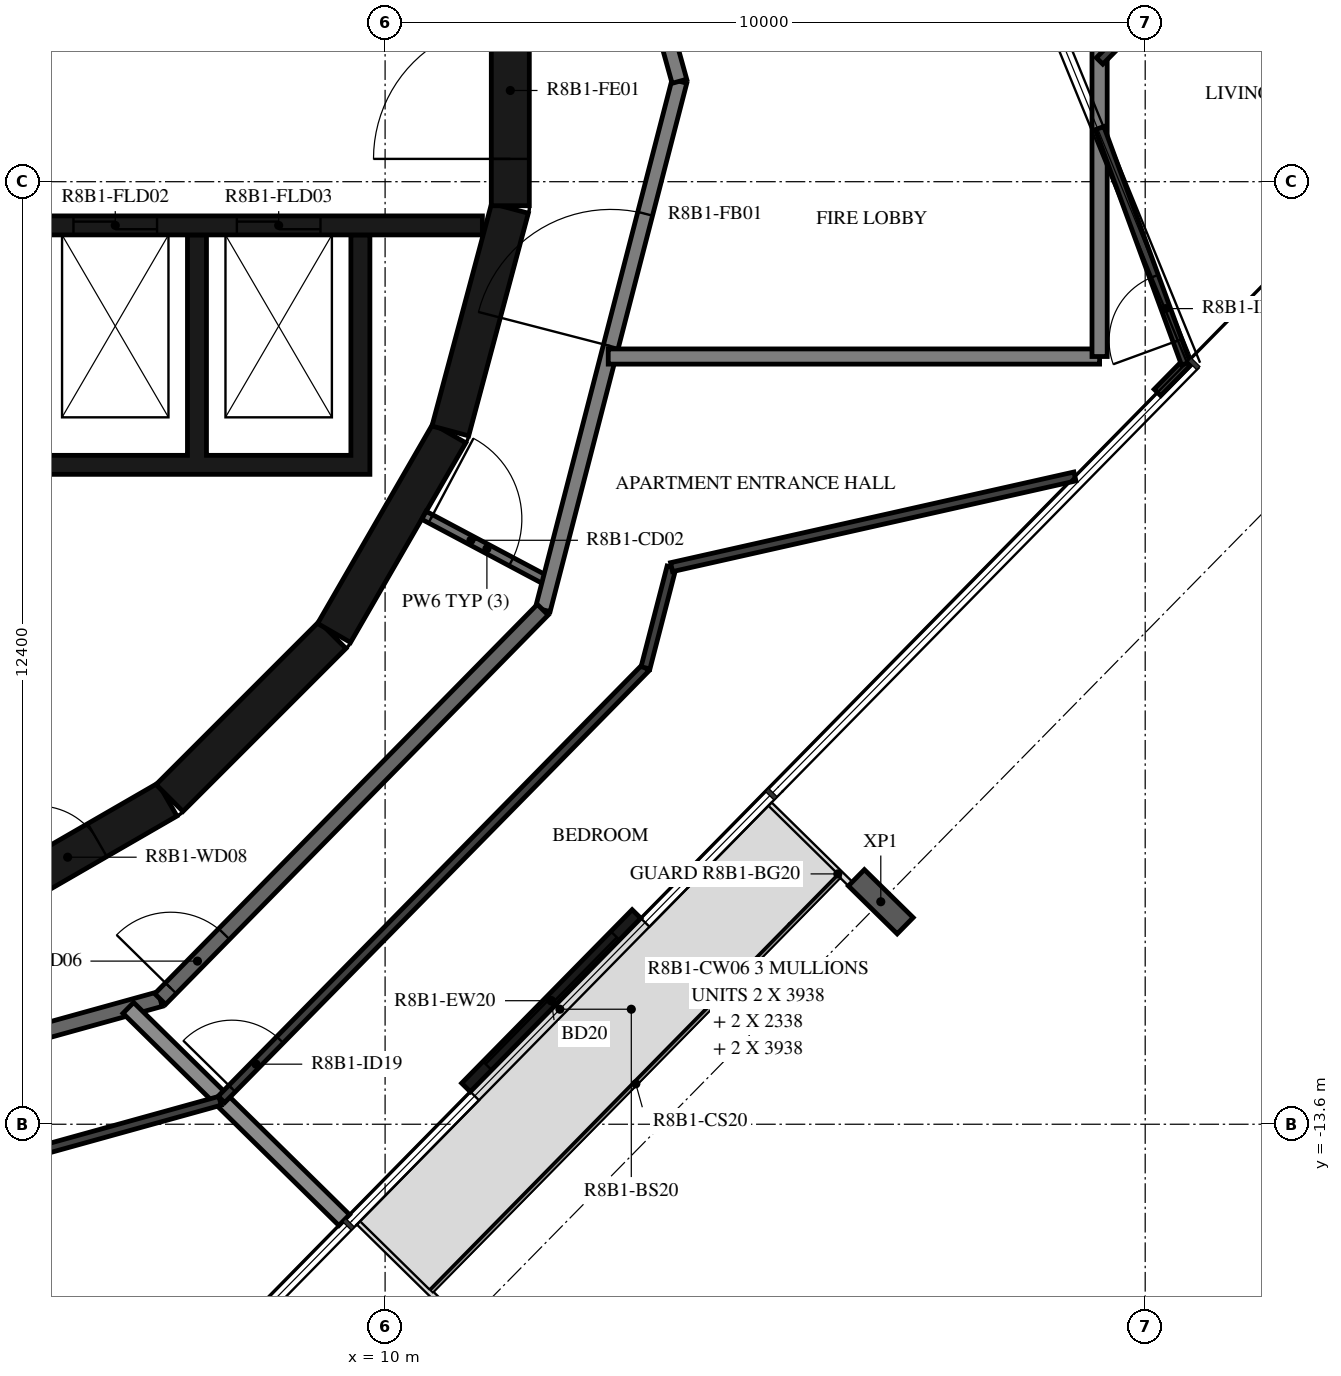
"""IFC4 building model, lengths in metres.
Left out: names, types, materials, properties, quantities, classifications, styles, units other than length and angle.
Written with IfcOpenShell. Run it as: python <this file> out.ifc"""

import sys

from ifc_helpers import new_model, si_unit, direction, frame, frame_2d, origin, origin_2d, place, context, subcontext, project, spatial, polyline, rectangle, i_section, outline, extrude, element, fill, save


model = new_model("IFC4")
c1 = context("Model", 3, precision=1e-05, world=origin(), true_north=direction((0.0, 1.0)))
c2 = subcontext(c1, "Body", "Model", "MODEL_VIEW")
j1 = project(units=[si_unit("LENGTHUNIT", "METRE"), si_unit("PLANEANGLEUNIT", "RADIAN")], contexts=[c1])
p1 = place(None, origin())
s1 = spatial("IfcSite", under=j1, at=p1, CompositionType="ELEMENT")
p2 = place(p1, origin())
s2 = spatial("IfcBuilding", under=s1, at=p2, CompositionType="ELEMENT")
p3 = place(p2, frame((0.0, 0.0, 308.7)))
s3 = spatial("IfcBuildingStorey", under=s2, at=p3, CompositionType="ELEMENT", Elevation=308.7)
p4 = place(p3, frame((16.521, -10.673, -0.38), z_axis=(0.0, 0.0, 1.0), x_axis=(-0.70090935439, -0.713250360623, 0.0)))
e1 = element("IfcColumn", 1, at=p4, inside=s3, PredefinedType="COLUMN", context=c2, shape_type="SweptSolid", body=[
    extrude(i_section(OverallWidth=0.3, OverallDepth=0.9, WebThickness=0.019, FlangeThickness=0.035, FilletRadius=0.03, at=origin_2d()), origin(), (0.0, 0.0, 1.0), 3.5),
])
p5 = place(p3, frame((11.064, -13.116, 0.0), z_axis=(0.0, 0.0, 1.0), x_axis=(0.700900076932, 0.713259477439, 0.0)))
e2 = element("IfcWall", 2, at=p5, inside=s3, PredefinedType="STANDARD", context=c2, shape_type="SweptSolid", body=[
    extrude(rectangle(XDim=3.2, YDim=0.16, at=frame_2d((1.6, 0.0))), origin(), (0.0, 0.0, 1.0), 3.12),
])
p6 = place(p5, frame((0.4, 0.0, 0.0)))
e3 = element("IfcOpeningElement", 3, at=p6, cuts=e2, PredefinedType="OPENING", context=c2, shape_type="SweptSolid", body=[
    extrude(rectangle(XDim=2.4, YDim=2.4, at=frame_2d((1.2, 1.2))), frame((0.0, 0.09, 0.0), z_axis=(0.0, -1.0, 0.0), x_axis=(1.0, 0.0, 0.0)), (0.0, 0.0, 1.0), 0.18),
])
p7 = place(p3, frame((4.51, -10.845, 0.0), z_axis=(0.0, 0.0, 1.0), x_axis=(0.865975092491, 0.500087131594, 0.0)))
e4 = element("IfcWall", 4, at=p7, inside=s3, PredefinedType="SHEAR", context=c2, shape_type="SweptSolid", body=[
    extrude(rectangle(XDim=3.033, YDim=0.5, at=frame_2d((1.516, 0.0))), origin(), (0.0, 0.0, 1.0), 3.12),
])
p8 = place(p7, frame((1.066, 0.0, 0.0)))
e5 = element("IfcOpeningElement", 5, at=p8, cuts=e4, PredefinedType="OPENING", context=c2, shape_type="SweptSolid", body=[
    extrude(rectangle(XDim=0.9, YDim=2.1, at=frame_2d((0.45, 1.05))), frame((0.0, 0.26, 0.0), z_axis=(0.0, -1.0, 0.0), x_axis=(1.0, 0.0, 0.0)), (0.0, 0.0, 1.0), 0.52),
])
p9 = place(p3, frame((7.164, -9.308, 0.0), z_axis=(0.0, 0.0, 1.0), x_axis=(0.707106781187, 0.707106781187, 0.0)))
e6 = element("IfcWall", 6, at=p9, inside=s3, PredefinedType="SHEAR", context=c2, shape_type="SweptSolid", body=[
    extrude(rectangle(XDim=3.032, YDim=0.5, at=frame_2d((1.516, 0.0))), origin(), (0.0, 0.0, 1.0), 3.12),
])
for number, where, z_axis, x_axis in (
    (7, (9.329, -7.137, 0.0), (0.0, 0.0, 1.0), (0.5, 0.866, 0.0)),
    (8, (10.858, -4.479, 0.0), (0.0, 0.0, 1.0), (0.259, 0.966, 0.0)),
):
    element("IfcWall", number, at=place(p3, frame(where, z_axis=z_axis, x_axis=x_axis)), inside=s3, PredefinedType="SHEAR", context=c2, shape_type="SweptSolid", body=[
        extrude(rectangle(XDim=3.033, YDim=0.5, at=frame_2d((1.516, 0.0))), origin(), (0.0, 0.0, 1.0), 3.12),
    ])
p10 = place(p3, frame((11.647, -1.516, 0.0), z_axis=(0.0, 0.0, 1.0), x_axis=(0.0, 1.0, 0.0)))
e9 = element("IfcWall", 9, at=p10, inside=s3, PredefinedType="SHEAR", context=c2, shape_type="SweptSolid", body=[
    extrude(rectangle(XDim=3.033, YDim=0.5, at=frame_2d((1.516, 0.0))), origin(), (0.0, 0.0, 1.0), 3.12),
])
p11 = place(p10, frame((0.616, 0.0, 0.0)))
e10 = element("IfcOpeningElement", 10, at=p11, cuts=e9, PredefinedType="OPENING", context=c2, shape_type="SweptSolid", body=[
    extrude(rectangle(XDim=1.8, YDim=2.1, at=frame_2d((0.9, 1.05))), frame((0.0, 0.26, 0.0), z_axis=(0.0, -1.0, 0.0), x_axis=(1.0, 0.0, 0.0)), (0.0, 0.0, 1.0), 0.52),
])
p12 = place(p3, origin())
e11 = element("IfcWall", 11, at=p12, inside=s3, PredefinedType="SHEAR", context=c2, shape_type="SweptSolid", body=[
    extrude(outline(polyline([(9.8, -5.05), (9.8, -4.8), (9.8, -1.9), (9.55, -1.9), (9.55, -4.8), (7.65, -4.8), (7.65, -1.9), (7.4, -1.9), (7.4, -4.8), (5.5, -4.8), (5.5, -1.9), (5.25, -1.9), (5.25, -4.8), (3.35, -4.8), (3.35, -1.9), (3.1, -1.9), (3.1, -4.8), (1.2, -4.8), (1.2, -1.9), (0.95, -1.9), (0.95, -4.8), (-0.95, -4.8), (-0.95, -1.9), (-1.2, -1.9), (-1.2, -4.8), (-3.1, -4.8), (-3.1, -1.9), (-3.35, -1.9), (-3.35, -4.8), (-5.25, -4.8), (-5.25, -1.9), (-5.5, -1.9), (-5.5, -4.8), (-9.55, -4.8), (-9.55, -1.9), (-9.8, -1.9), (-9.8, -4.8), (-9.8, -5.05), (9.8, -5.05)])), origin(), (0.0, 0.0, 1.0), 3.12),
])
p13 = place(p3, frame((3.35, -1.775, 0.0), z_axis=(0.0, 0.0, 1.0), x_axis=(1.0, 0.0, 0.0)))
e12 = element("IfcWall", 12, at=p13, inside=s3, PredefinedType="SHEAR", context=c2, shape_type="SweptSolid", body=[
    extrude(rectangle(XDim=7.93, YDim=0.25, at=frame_2d((3.965, 0.0))), origin(), (0.0, 0.0, 1.0), 3.12),
])
p14 = place(p13, frame((0.4, 0.0, 0.0)))
e13 = element("IfcOpeningElement", 13, at=p14, cuts=e12, PredefinedType="OPENING", context=c2, shape_type="SweptSolid", body=[
    extrude(rectangle(XDim=1.1, YDim=2.4, at=frame_2d((0.55, 1.2))), frame((0.0, 0.135, 0.0), z_axis=(0.0, -1.0, 0.0), x_axis=(1.0, 0.0, 0.0)), (0.0, 0.0, 1.0), 0.27),
])
p15 = place(p13, frame((2.55, 0.0, 0.0)))
e14 = element("IfcOpeningElement", 14, at=p15, cuts=e12, PredefinedType="OPENING", context=c2, shape_type="SweptSolid", body=[
    extrude(rectangle(XDim=1.1, YDim=2.4, at=frame_2d((0.55, 1.2))), frame((0.0, 0.135, 0.0), z_axis=(0.0, -1.0, 0.0), x_axis=(1.0, 0.0, 0.0)), (0.0, 0.0, 1.0), 0.27),
])
p16 = place(p13, frame((4.7, 0.0, 0.0)))
e15 = element("IfcOpeningElement", 15, at=p16, cuts=e12, PredefinedType="OPENING", context=c2, shape_type="SweptSolid", body=[
    extrude(rectangle(XDim=1.1, YDim=2.4, at=frame_2d((0.55, 1.2))), frame((0.0, 0.135, 0.0), z_axis=(0.0, -1.0, 0.0), x_axis=(1.0, 0.0, 0.0)), (0.0, 0.0, 1.0), 0.27),
])
p17 = place(p3, frame((10.511, -5.589, 0.0), z_axis=(0.0, 0.0, 1.0), x_axis=(0.882957311919, -0.469453283437, 0.0)))
e16 = element("IfcWall", 16, at=p17, inside=s3, PredefinedType="PARTITIONING", context=c2, shape_type="SweptSolid", body=[
    extrude(rectangle(XDim=1.876, YDim=0.12, at=frame_2d((0.938, 0.0))), origin(), (0.0, 0.0, 1.0), 3.12),
])
p18 = place(p17, frame((0.1, 0.0, 0.0)))
e17 = element("IfcOpeningElement", 17, at=p18, cuts=e16, PredefinedType="OPENING", context=c2, shape_type="SweptSolid", body=[
    extrude(rectangle(XDim=1.2, YDim=2.1, at=frame_2d((0.6, 1.05))), frame((0.0, 0.07, 0.0), z_axis=(0.0, -1.0, 0.0), x_axis=(1.0, 0.0, 0.0)), (0.0, 0.0, 1.0), 0.14),
])
p19 = place(p3, frame((12.074, -6.831, 0.0), z_axis=(0.0, 0.0, 1.0), x_axis=(0.250391063186, 0.968144780225, 0.0)))
e18 = element("IfcWall", 18, at=p19, inside=s3, PredefinedType="STANDARD", context=c2, shape_type="SweptSolid", body=[
    extrude(rectangle(XDim=7.181, YDim=0.2, at=frame_2d((3.591, 0.0))), origin(), (0.0, 0.0, 1.0), 3.12),
])
p20 = place(p19, frame((3.581, 0.0, 0.0)))
e19 = element("IfcOpeningElement", 19, at=p20, cuts=e18, PredefinedType="OPENING", context=c2, shape_type="SweptSolid", body=[
    extrude(rectangle(XDim=1.8, YDim=2.1, at=frame_2d((0.9, 1.05))), frame((0.0, 0.11, 0.0), z_axis=(0.0, -1.0, 0.0), x_axis=(1.0, 0.0, 0.0)), (0.0, 0.0, 1.0), 0.22),
])
p21 = place(p3, frame((13.872, 0.121, 0.0), z_axis=(0.0, 0.0, 1.0), x_axis=(-0.267291928416, 0.963615600228, 0.0)))
e20 = element("IfcWall", 20, at=p21, inside=s3, PredefinedType="STANDARD", context=c2, shape_type="SweptSolid", body=[
    extrude(rectangle(XDim=3.507, YDim=0.2, at=frame_2d((1.753, 0.0))), origin(), (0.0, 0.0, 1.0), 3.12),
])
p22 = place(p3, frame((0.121, -13.872, 0.0), z_axis=(0.0, 0.0, 1.0), x_axis=(0.963625960674, 0.267254575108, 0.0)))
e21 = element("IfcWall", 21, at=p22, inside=s3, PredefinedType="STANDARD", context=c2, shape_type="SweptSolid", body=[
    extrude(rectangle(XDim=7.181, YDim=0.2, at=frame_2d((3.591, 0.0))), origin(), (0.0, 0.0, 1.0), 3.12),
])
p23 = place(p3, frame((7.041, -11.953, 0.0), z_axis=(0.0, 0.0, 1.0), x_axis=(0.70090916255, 0.713250549143, 0.0)))
e22 = element("IfcWall", 22, at=p23, inside=s3, PredefinedType="STANDARD", context=c2, shape_type="SweptSolid", body=[
    extrude(rectangle(XDim=7.181, YDim=0.2, at=frame_2d((3.59, 0.0))), origin(), (0.0, 0.0, 1.0), 3.12),
])
p24 = place(p23, frame((0.2, 0.0, 0.0)))
e23 = element("IfcOpeningElement", 23, at=p24, cuts=e22, PredefinedType="OPENING", context=c2, shape_type="SweptSolid", body=[
    extrude(rectangle(XDim=1.0, YDim=2.1, at=frame_2d((0.5, 1.05))), frame((0.0, 0.11, 0.0), z_axis=(0.0, -1.0, 0.0), x_axis=(1.0, 0.0, 0.0)), (0.0, 0.0, 1.0), 0.22),
])
p25 = place(p3, frame((12.936, -3.5, 0.0), z_axis=(0.0, 0.0, 1.0), x_axis=(1.0, 0.0, 0.0)))
e24 = element("IfcWall", 24, at=p25, inside=s3, PredefinedType="STANDARD", context=c2, shape_type="SweptSolid", body=[
    extrude(rectangle(XDim=6.464, YDim=0.2, at=frame_2d((3.232, 0.0))), origin(), (0.0, 0.0, 1.0), 3.12),
])
p26 = place(p3, frame((19.4, -3.5, 0.0), z_axis=(0.0, 0.0, 1.0), x_axis=(0.0, 1.0, 0.0)))
e25 = element("IfcWall", 25, at=p26, inside=s3, PredefinedType="STANDARD", context=c2, shape_type="SweptSolid", body=[
    extrude(rectangle(XDim=6.954, YDim=0.2, at=frame_2d((3.477, 0.0))), origin(), (0.0, 0.0, 1.0), 3.12),
])
p27 = place(p3, frame((9.462, -14.861, 0.0), z_axis=(0.0, 0.0, 1.0), x_axis=(-0.713302018318, 0.700856783276, 0.0)))
e26 = element("IfcWall", 26, at=p27, inside=s3, PredefinedType="STANDARD", context=c2, shape_type="SweptSolid", body=[
    extrude(rectangle(XDim=3.982, YDim=0.2, at=frame_2d((1.991, 0.0))), origin(), (0.0, 0.0, 1.0), 2.73),
])
p28 = place(p3, frame((0.135, -15.425, 0.0), z_axis=(0.0, 0.0, 1.0), x_axis=(0.963633899075, 0.267225950373, 0.0)))
e27 = element("IfcWall", 27, at=p28, inside=s3, PredefinedType="PARTITIONING", context=c2, shape_type="SweptSolid", body=[
    extrude(rectangle(XDim=7.985, YDim=0.12, at=frame_2d((3.992, 0.0))), origin(), (0.0, 0.0, 1.0), 3.12),
])
p29 = place(p28, frame((0.714, 0.0, 0.0)))
e28 = element("IfcOpeningElement", 28, at=p29, cuts=e27, PredefinedType="OPENING", context=c2, shape_type="SweptSolid", body=[
    extrude(rectangle(XDim=0.9, YDim=2.1, at=frame_2d((0.45, 1.05))), frame((0.0, 0.07, 0.0), z_axis=(0.0, -1.0, 0.0), x_axis=(1.0, 0.0, 0.0)), (0.0, 0.0, 1.0), 0.14),
])
p30 = place(p28, frame((2.467, 0.0, 0.0)))
e29 = element("IfcOpeningElement", 29, at=p30, cuts=e27, PredefinedType="OPENING", context=c2, shape_type="SweptSolid", body=[
    extrude(rectangle(XDim=0.9, YDim=2.1, at=frame_2d((0.45, 1.05))), frame((0.0, 0.07, 0.0), z_axis=(0.0, -1.0, 0.0), x_axis=(1.0, 0.0, 0.0)), (0.0, 0.0, 1.0), 0.14),
])
p31 = place(p3, frame((20.566, -3.561, 0.0), z_axis=(0.0, 0.0, 1.0), x_axis=(-0.700950066256, -0.713210350889, 0.0)))
e30 = element("IfcWall", 30, at=p31, inside=s3, PredefinedType="PARTITIONING", context=c2, shape_type="SweptSolid", body=[
    extrude(rectangle(XDim=0.577, YDim=0.12, at=frame_2d((0.289, 0.0))), origin(), (0.0, 0.0, 1.0), 3.12),
])
p32 = place(p3, frame((20.535, -3.593, 0.0), z_axis=(0.0, 0.0, 1.0), x_axis=(-0.344065452993, 0.93894566619, 0.0)))
e31 = element("IfcWall", 31, at=p32, inside=s3, PredefinedType="PARTITIONING", context=c2, shape_type="SweptSolid", body=[
    extrude(rectangle(XDim=3.299, YDim=0.12, at=frame_2d((1.649, 0.0))), origin(), (0.0, 0.0, 1.0), 3.12),
])
p33 = place(p32, frame((0.32, 0.0, 0.0)))
e32 = element("IfcOpeningElement", 32, at=p33, cuts=e31, PredefinedType="OPENING", context=c2, shape_type="SweptSolid", body=[
    extrude(rectangle(XDim=0.9, YDim=2.1, at=frame_2d((0.45, 1.05))), frame((0.0, 0.07, 0.0), z_axis=(0.0, -1.0, 0.0), x_axis=(1.0, 0.0, 0.0)), (0.0, 0.0, 1.0), 0.14),
])
p34 = place(p3, frame((7.846, -13.273, 0.0), z_axis=(0.0, 0.0, 1.0), x_axis=(0.700915117659, 0.713244697027, 0.0)))
e33 = element("IfcWall", 33, at=p34, inside=s3, PredefinedType="PARTITIONING", context=c2, shape_type="SweptSolid", body=[
    extrude(rectangle(XDim=7.96, YDim=0.12, at=frame_2d((3.98, 0.0))), origin(), (0.0, 0.0, 1.0), 3.12),
])
p35 = place(p34, frame((0.2, 0.0, 0.0)))
e34 = element("IfcOpeningElement", 34, at=p35, cuts=e33, PredefinedType="OPENING", context=c2, shape_type="SweptSolid", body=[
    extrude(rectangle(XDim=0.9, YDim=2.1, at=frame_2d((0.45, 1.05))), frame((0.0, 0.07, 0.0), z_axis=(0.0, -1.0, 0.0), x_axis=(1.0, 0.0, 0.0)), (0.0, 0.0, 1.0), 0.14),
])
p36 = place(p3, frame((13.426, -7.596, 0.0), z_axis=(0.0, 0.0, 1.0), x_axis=(0.250417410425, 0.968137965662, 0.0)))
e35 = element("IfcWall", 35, at=p36, inside=s3, PredefinedType="PARTITIONING", context=c2, shape_type="SweptSolid", body=[
    extrude(rectangle(XDim=1.369, YDim=0.12, at=frame_2d((0.685, 0.0))), origin(), (0.0, 0.0, 1.0), 3.12),
])
p37 = place(p3, frame((13.769, -6.271, 0.0), z_axis=(0.0, 0.0, 1.0), x_axis=(0.975656114164, 0.219306057589, 0.0)))
e36 = element("IfcWall", 36, at=p37, inside=s3, PredefinedType="PARTITIONING", context=c2, shape_type="SweptSolid", body=[
    extrude(rectangle(XDim=5.439, YDim=0.12, at=frame_2d((2.72, 0.0))), origin(), (0.0, 0.0, 1.0), 3.12),
])
p38 = place(p3, frame((20.654, 1.665, 0.0), z_axis=(0.0, 0.0, 1.0), x_axis=(-0.700870484553, -0.713288555833, 0.0)))
e37 = element("IfcWall", 37, at=p38, inside=s3, PredefinedType="PARTITIONING", context=c2, shape_type="SweptSolid", body=[
    extrude(rectangle(XDim=1.789, YDim=0.12, at=frame_2d((0.895, 0.0))), origin(), (0.0, 0.0, 1.0), 3.12),
])
p39 = place(p6, origin())
e38 = element("IfcDoor", 38, at=p39, inside=s3, OperationType="DOUBLE_DOOR_SLIDING", PredefinedType="DOOR", context=c2, shape_type="SweptSolid", body=[
    extrude(rectangle(XDim=2.4, YDim=2.4, at=frame_2d((1.2, 1.2))), frame((0.0, 0.025, 0.0), z_axis=(0.0, -1.0, 0.0), x_axis=(1.0, 0.0, 0.0)), (0.0, 0.0, 1.0), 0.05),
])
fill(e3, e38)
p40 = place(p11, origin())
e39 = element("IfcDoor", 39, at=p40, inside=s3, OperationType="DOUBLE_DOOR_SINGLE_SWING", PredefinedType="DOOR", context=c2, shape_type="SweptSolid", body=[
    extrude(rectangle(XDim=1.8, YDim=2.1, at=frame_2d((0.9, 1.05))), frame((0.0, 0.025, 0.0), z_axis=(0.0, -1.0, 0.0), x_axis=(1.0, 0.0, 0.0)), (0.0, 0.0, 1.0), 0.05),
])
fill(e10, e39)
p41 = place(p15, origin())
e40 = element("IfcDoor", 40, at=p41, inside=s3, OperationType="DOUBLE_DOOR_SLIDING", PredefinedType="DOOR", context=c2, shape_type="SweptSolid", body=[
    extrude(rectangle(XDim=1.1, YDim=2.4, at=frame_2d((0.55, 1.2))), frame((0.0, 0.025, 0.0), z_axis=(0.0, -1.0, 0.0), x_axis=(1.0, 0.0, 0.0)), (0.0, 0.0, 1.0), 0.05),
])
fill(e14, e40)
p42 = place(p16, origin())
e41 = element("IfcDoor", 41, at=p42, inside=s3, OperationType="DOUBLE_DOOR_SLIDING", PredefinedType="DOOR", context=c2, shape_type="SweptSolid", body=[
    extrude(rectangle(XDim=1.1, YDim=2.4, at=frame_2d((0.55, 1.2))), frame((0.0, 0.025, 0.0), z_axis=(0.0, -1.0, 0.0), x_axis=(1.0, 0.0, 0.0)), (0.0, 0.0, 1.0), 0.05),
])
fill(e15, e41)
p43 = place(p8, origin())
e42 = element("IfcDoor", 42, at=p43, inside=s3, OperationType="SINGLE_SWING_RIGHT", PredefinedType="DOOR", context=c2, shape_type="SweptSolid", body=[
    extrude(rectangle(XDim=0.9, YDim=2.1, at=frame_2d((0.45, 1.05))), frame((0.0, 0.025, 0.0), z_axis=(0.0, -1.0, 0.0), x_axis=(1.0, 0.0, 0.0)), (0.0, 0.0, 1.0), 0.05),
])
fill(e5, e42)
p44 = place(p24, origin())
e43 = element("IfcDoor", 43, at=p44, inside=s3, OperationType="SINGLE_SWING_LEFT", PredefinedType="DOOR", context=c2, shape_type="SweptSolid", body=[
    extrude(rectangle(XDim=1.0, YDim=2.1, at=frame_2d((0.5, 1.05))), frame((0.0, 0.025, 0.0), z_axis=(0.0, -1.0, 0.0), x_axis=(1.0, 0.0, 0.0)), (0.0, 0.0, 1.0), 0.05),
])
fill(e23, e43)
p45 = place(p33, origin())
e44 = element("IfcDoor", 44, at=p45, inside=s3, OperationType="SINGLE_SWING_RIGHT", PredefinedType="DOOR", context=c2, shape_type="SweptSolid", body=[
    extrude(rectangle(XDim=0.9, YDim=2.1, at=frame_2d((0.45, 1.05))), frame((0.0, 0.025, 0.0), z_axis=(0.0, -1.0, 0.0), x_axis=(1.0, 0.0, 0.0)), (0.0, 0.0, 1.0), 0.05),
])
fill(e32, e44)
p46 = place(p35, origin())
e45 = element("IfcDoor", 45, at=p46, inside=s3, OperationType="SINGLE_SWING_LEFT", PredefinedType="DOOR", context=c2, shape_type="SweptSolid", body=[
    extrude(rectangle(XDim=0.9, YDim=2.1, at=frame_2d((0.45, 1.05))), frame((0.0, 0.025, 0.0), z_axis=(0.0, -1.0, 0.0), x_axis=(1.0, 0.0, 0.0)), (0.0, 0.0, 1.0), 0.05),
])
fill(e34, e45)
p47 = place(p18, origin())
e46 = element("IfcDoor", 46, at=p47, inside=s3, OperationType="DOUBLE_DOOR_SINGLE_SWING", PredefinedType="DOOR", context=c2, shape_type="SweptSolid", body=[
    extrude(rectangle(XDim=1.2, YDim=2.1, at=frame_2d((0.6, 1.05))), frame((0.0, 0.025, 0.0), z_axis=(0.0, -1.0, 0.0), x_axis=(1.0, 0.0, 0.0)), (0.0, 0.0, 1.0), 0.05),
])
fill(e17, e46)
p48 = place(p20, origin())
e47 = element("IfcDoor", 47, at=p48, inside=s3, OperationType="DOUBLE_DOOR_SINGLE_SWING", PredefinedType="DOOR", context=c2, shape_type="SweptSolid", body=[
    extrude(rectangle(XDim=1.8, YDim=2.1, at=frame_2d((0.9, 1.05))), frame((0.0, 0.025, 0.0), z_axis=(0.0, -1.0, 0.0), x_axis=(1.0, 0.0, 0.0)), (0.0, 0.0, 1.0), 0.05),
])
fill(e19, e47)
save(model, sys.argv[1])
